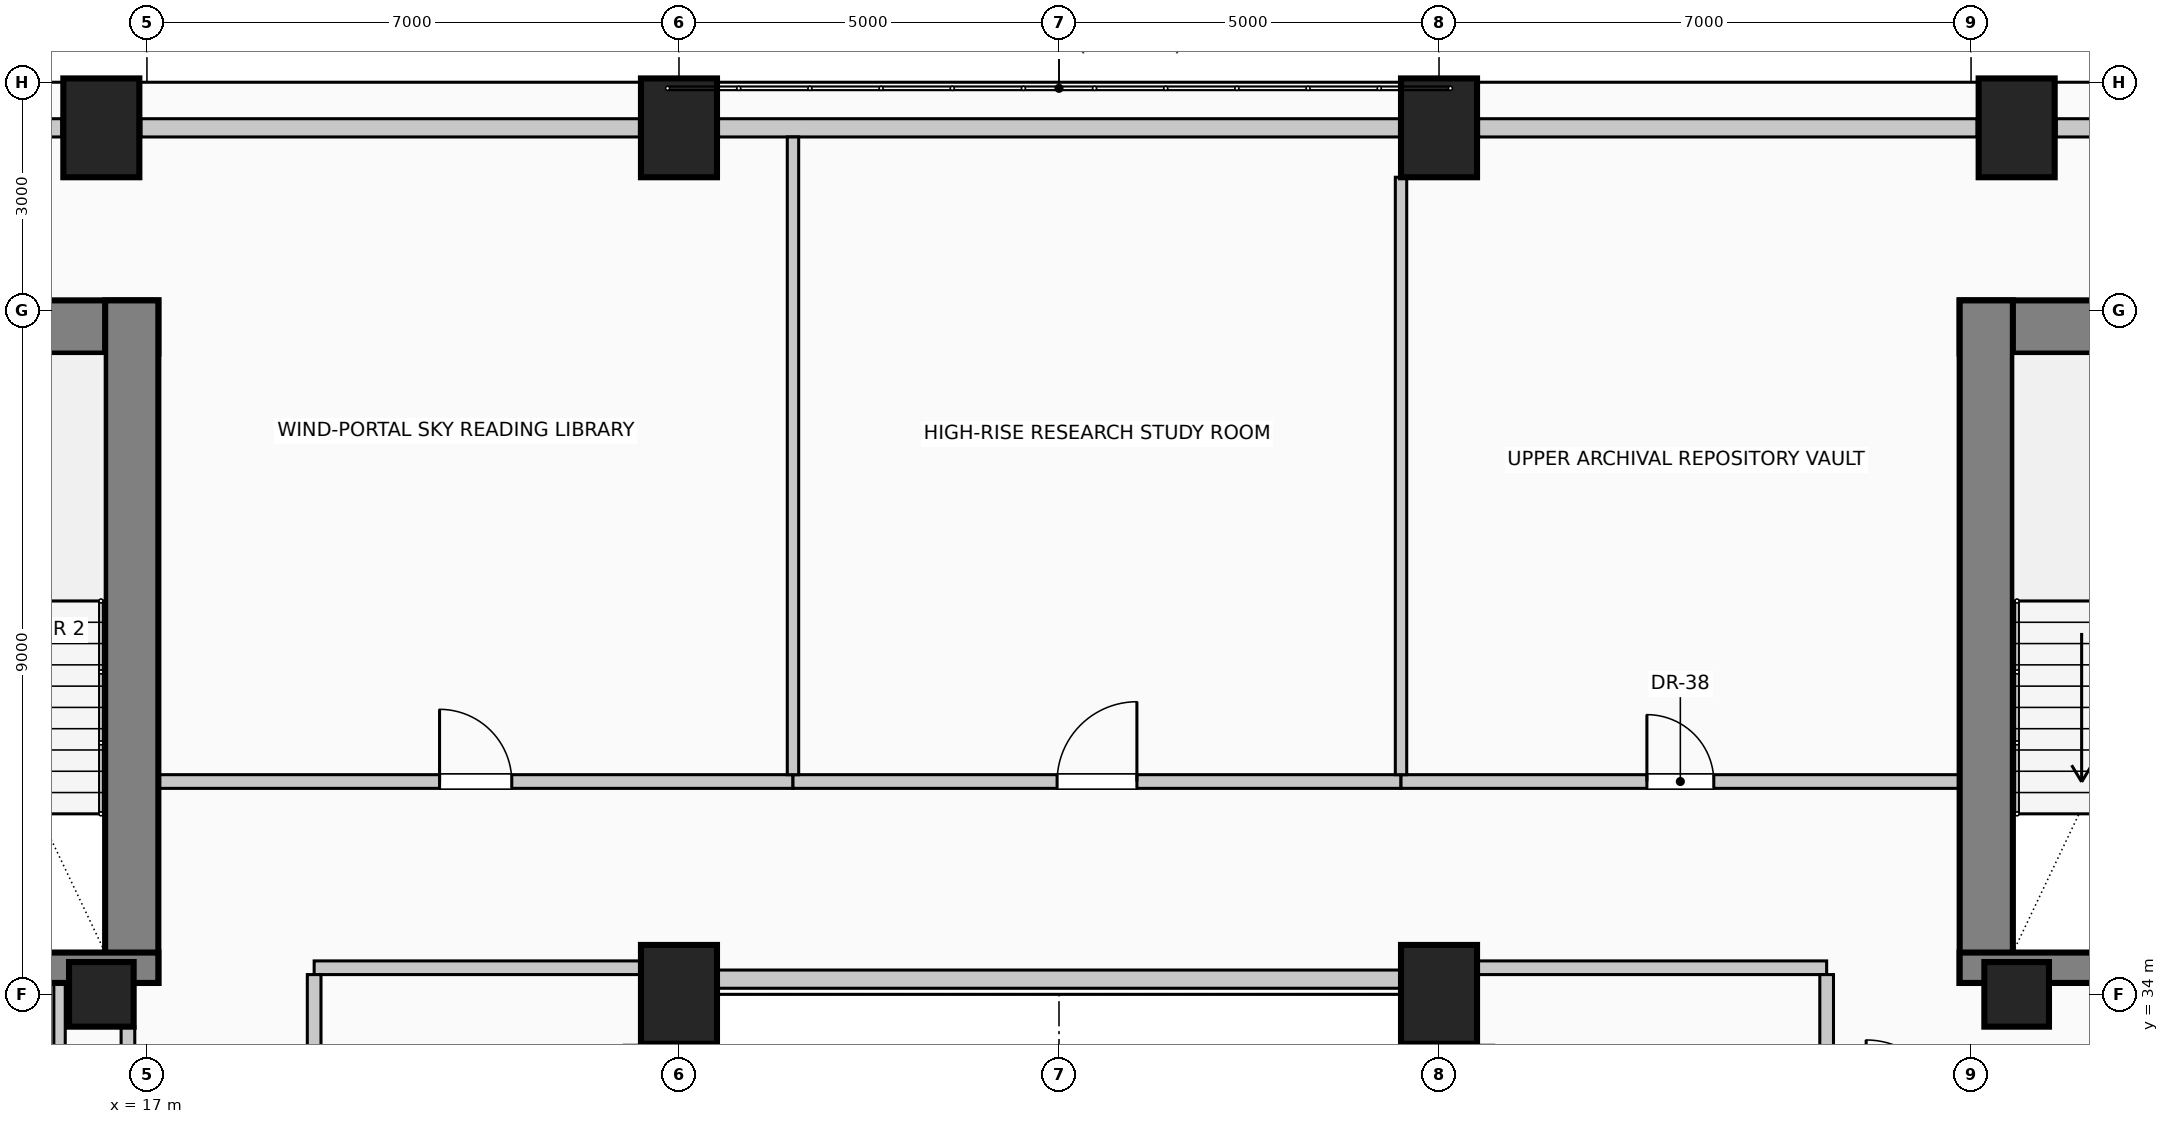
"""IFC4 building model, lengths in metres.
Left out: names, types, materials, properties, quantities, classifications, styles, units other than length and angle.
Written with IfcOpenShell. Run it as: python <this file> out.ifc"""

import sys

from ifc_helpers import new_model, si_unit, direction, frame, frame_2d, origin, origin_2d, place, context, subcontext, project, spatial, rectangle, circle, extrude, element, fill, save


model = new_model("IFC4")
c1 = context("Model", 3, precision=1e-05, world=origin(), true_north=direction((0.0, 1.0)))
c2 = subcontext(c1, "Body", "Model", "MODEL_VIEW")
j1 = project(units=[si_unit("LENGTHUNIT", "METRE"), si_unit("PLANEANGLEUNIT", "RADIAN")], contexts=[c1])
p1 = place(None, origin())
s1 = spatial("IfcSite", under=j1, at=p1, CompositionType="ELEMENT")
p2 = place(p1, origin())
s2 = spatial("IfcBuilding", under=s1, at=p2, CompositionType="ELEMENT")
p3 = place(p2, frame((0.0, 0.0, 198.6)))
s3 = spatial("IfcBuildingStorey", under=s2, at=p3, CompositionType="ELEMENT", Elevation=198.6)
p4 = place(p3, frame((2.85, 42.78, 0.0), z_axis=(0.0, 0.0, 1.0), x_axis=(1.0, 0.0, 0.0)))
e1 = element("IfcWall", 1, at=p4, inside=s3, PredefinedType="SHEAR", context=c2, shape_type="SweptSolid", body=[
    extrude(rectangle(XDim=14.3, YDim=0.7, at=frame_2d((7.15, 0.0))), origin(), (0.0, 0.0, 1.0), 4.0),
])
p5 = place(p3, frame((16.8, 34.15, 0.0), z_axis=(0.0, 0.0, 1.0), x_axis=(0.0, 1.0, 0.0)))
e2 = element("IfcWall", 2, at=p5, inside=s3, PredefinedType="SHEAR", context=c2, shape_type="SweptSolid", body=[
    extrude(rectangle(XDim=8.98, YDim=0.7, at=frame_2d((4.49, 0.0))), origin(), (0.0, 0.0, 1.0), 4.0),
])
p6 = place(p3, frame((12.29, 34.35, 0.0), z_axis=(0.0, 0.0, 1.0), x_axis=(1.0, 0.0, 0.0)))
e3 = element("IfcWall", 3, at=p6, inside=s3, PredefinedType="SHEAR", context=c2, shape_type="SweptSolid", body=[
    extrude(rectangle(XDim=4.86, YDim=0.4, at=frame_2d((2.43, 0.0))), origin(), (0.0, 0.0, 1.0), 4.0),
])
p7 = place(p6, frame((1.4, 0.0, 0.0)))
e4 = element("IfcOpeningElement", 4, at=p7, cuts=e3, PredefinedType="OPENING", context=c2, shape_type="SweptSolid", body=[
    extrude(rectangle(XDim=1.15, YDim=2.2, at=frame_2d((0.575, 1.1))), frame((0.0, 0.21, 0.0), z_axis=(0.0, -1.0, 0.0), x_axis=(1.0, 0.0, 0.0)), (0.0, 0.0, 1.0), 0.42),
])
p8 = place(p3, frame((40.85, 42.78, 0.0), z_axis=(0.0, 0.0, 1.0), x_axis=(1.0, 0.0, 0.0)))
e5 = element("IfcWall", 5, at=p8, inside=s3, PredefinedType="SHEAR", context=c2, shape_type="SweptSolid", body=[
    extrude(rectangle(XDim=14.3, YDim=0.7, at=frame_2d((7.15, 0.0))), origin(), (0.0, 0.0, 1.0), 4.0),
])
p9 = place(p3, frame((41.2, 34.15, 0.0), z_axis=(0.0, 0.0, 1.0), x_axis=(0.0, 1.0, 0.0)))
e6 = element("IfcWall", 6, at=p9, inside=s3, PredefinedType="SHEAR", context=c2, shape_type="SweptSolid", body=[
    extrude(rectangle(XDim=8.98, YDim=0.7, at=frame_2d((4.49, 0.0))), origin(), (0.0, 0.0, 1.0), 4.0),
])
p10 = place(p3, frame((40.85, 34.35, 0.0), z_axis=(0.0, 0.0, 1.0), x_axis=(1.0, 0.0, 0.0)))
e7 = element("IfcWall", 7, at=p10, inside=s3, PredefinedType="SHEAR", context=c2, shape_type="SweptSolid", body=[
    extrude(rectangle(XDim=4.86, YDim=0.4, at=frame_2d((2.43, 0.0))), origin(), (0.0, 0.0, 1.0), 4.0),
])
p11 = place(p10, frame((2.4, 0.0, 0.0)))
e8 = element("IfcOpeningElement", 8, at=p11, cuts=e7, PredefinedType="OPENING", context=c2, shape_type="SweptSolid", body=[
    extrude(rectangle(XDim=1.15, YDim=2.2, at=frame_2d((0.575, 1.1))), frame((0.0, 0.21, 0.0), z_axis=(0.0, -1.0, 0.0), x_axis=(1.0, 0.0, 0.0)), (0.0, 0.0, 1.0), 0.42),
])
for number, where, z_axis, x_axis in (
    (9, (16.4, 45.4, 0.0), (0.0, 0.0, 1.0), (1.0, 0.0, 0.0)),
    (10, (24.0, 45.4, 0.0), (0.0, 0.0, 1.0), (1.0, 0.0, 0.0)),
    (11, (34.0, 45.4, 0.0), (0.0, 0.0, 1.0), (1.0, 0.0, 0.0)),
    (12, (41.6, 45.4, 0.0), (0.0, 0.0, 1.0), (1.0, 0.0, 0.0)),
    (13, (24.0, 34.0, 0.0), (0.0, 0.0, 1.0), (1.0, 0.0, 0.0)),
    (14, (34.0, 34.0, 0.0), (0.0, 0.0, 1.0), (1.0, 0.0, 0.0)),
):
    element("IfcColumn", number, at=place(p3, frame(where, z_axis=z_axis, x_axis=x_axis)), inside=s3, PredefinedType="COLUMN", context=c2, shape_type="SweptSolid", body=[
        extrude(rectangle(XDim=1.0, YDim=1.3, at=origin_2d()), origin(), (0.0, 0.0, 1.0), 4.0),
    ])
for number, where, z_axis, x_axis in (
    (15, (16.4, 34.0, 0.0), (0.0, 0.0, 1.0), (1.0, 0.0, 0.0)),
    (16, (41.6, 34.0, 0.0), (0.0, 0.0, 1.0), (1.0, 0.0, 0.0)),
):
    element("IfcColumn", number, at=place(p3, frame(where, z_axis=z_axis, x_axis=x_axis)), inside=s3, PredefinedType="COLUMN", context=c2, shape_type="SweptSolid", body=[
        extrude(circle(Radius=0.425, at=origin_2d()), origin(), (0.0, 0.0, 1.0), 4.0),
    ])
p12 = place(p3, frame((14.42, 45.4, 0.0), z_axis=(0.0, 0.0, 1.0), x_axis=(1.0, 0.0, 0.0)))
e17 = element("IfcWall", 17, at=p12, inside=s3, PredefinedType="SOLIDWALL", context=c2, shape_type="SweptSolid", body=[
    extrude(rectangle(XDim=1.46, YDim=0.24, at=frame_2d((0.73, 0.0))), origin(), (0.0, 0.0, 1.0), 3.0),
])
p13 = place(p3, frame((16.92, 45.4, 0.0), z_axis=(0.0, 0.0, 1.0), x_axis=(1.0, 0.0, 0.0)))
e18 = element("IfcWall", 18, at=p13, inside=s3, PredefinedType="SOLIDWALL", context=c2, shape_type="SweptSolid", body=[
    extrude(rectangle(XDim=6.56, YDim=0.24, at=frame_2d((3.28, 0.0))), origin(), (0.0, 0.0, 1.0), 3.0),
])
p14 = place(p3, frame((24.52, 45.4, 0.0), z_axis=(0.0, 0.0, 1.0), x_axis=(1.0, 0.0, 0.0)))
e19 = element("IfcWall", 19, at=p14, inside=s3, PredefinedType="SOLIDWALL", context=c2, shape_type="SweptSolid", body=[
    extrude(rectangle(XDim=8.96, YDim=0.24, at=frame_2d((4.48, 0.0))), origin(), (0.0, 0.0, 1.0), 0.75),
])
p15 = place(p3, frame((34.52, 45.4, 0.0), z_axis=(0.0, 0.0, 1.0), x_axis=(1.0, 0.0, 0.0)))
e20 = element("IfcWall", 20, at=p15, inside=s3, PredefinedType="SOLIDWALL", context=c2, shape_type="SweptSolid", body=[
    extrude(rectangle(XDim=6.56, YDim=0.24, at=frame_2d((3.28, 0.0))), origin(), (0.0, 0.0, 1.0), 3.0),
])
p16 = place(p3, frame((42.12, 45.4, 0.0), z_axis=(0.0, 0.0, 1.0), x_axis=(1.0, 0.0, 0.0)))
e21 = element("IfcWall", 21, at=p16, inside=s3, PredefinedType="SOLIDWALL", context=c2, shape_type="SweptSolid", body=[
    extrude(rectangle(XDim=1.46, YDim=0.24, at=frame_2d((0.73, 0.0))), origin(), (0.0, 0.0, 1.0), 3.0),
])
p17 = place(p3, frame((33.95, 34.2, 0.0), z_axis=(0.0, 0.0, 1.0), x_axis=(-1.0, 0.0, 0.0)))
e22 = element("IfcWall", 22, at=p17, inside=s3, PredefinedType="SOLIDWALL", context=c2, shape_type="SweptSolid", body=[
    extrude(rectangle(XDim=9.9, YDim=0.24, at=frame_2d((4.95, 0.0))), origin(), (0.0, 0.0, 1.0), 0.75),
])
p18 = place(p3, frame((19.2, 34.35, 0.0), z_axis=(0.0, 0.0, 1.0), x_axis=(1.0, 0.0, 0.0)))
e23 = element("IfcWall", 23, at=p18, inside=s3, PredefinedType="PARTITIONING", context=c2, shape_type="SweptSolid", body=[
    extrude(rectangle(XDim=4.3, YDim=0.18, at=frame_2d((2.15, 0.0))), origin(), (0.0, 0.0, 1.0), 3.75),
])
p19 = place(p3, frame((34.5, 34.35, 0.0), z_axis=(0.0, 0.0, 1.0), x_axis=(1.0, 0.0, 0.0)))
e24 = element("IfcWall", 24, at=p19, inside=s3, PredefinedType="PARTITIONING", context=c2, shape_type="SweptSolid", body=[
    extrude(rectangle(XDim=4.6, YDim=0.18, at=frame_2d((2.3, 0.0))), origin(), (0.0, 0.0, 1.0), 3.75),
])
p20 = place(p3, frame((17.15, 36.8, 0.0), z_axis=(0.0, 0.0, 1.0), x_axis=(1.0, 0.0, 0.0)))
e25 = element("IfcWall", 25, at=p20, inside=s3, PredefinedType="PARTITIONING", context=c2, shape_type="SweptSolid", body=[
    extrude(rectangle(XDim=8.35, YDim=0.18, at=frame_2d((4.175, 0.0))), origin(), (0.0, 0.0, 1.0), 3.75),
])
p21 = place(p20, frame((3.7, 0.0, 0.0)))
e26 = element("IfcOpeningElement", 26, at=p21, cuts=e25, PredefinedType="OPENING", context=c2, shape_type="SweptSolid", body=[
    extrude(rectangle(XDim=0.95, YDim=2.15, at=frame_2d((0.475, 1.075))), frame((0.0, 0.1, 0.0), z_axis=(0.0, -1.0, 0.0), x_axis=(1.0, 0.0, 0.0)), (0.0, 0.0, 1.0), 0.2),
])
p22 = place(p3, frame((25.5, 36.8, 0.0), z_axis=(0.0, 0.0, 1.0), x_axis=(1.0, 0.0, 0.0)))
e27 = element("IfcWall", 27, at=p22, inside=s3, PredefinedType="PARTITIONING", context=c2, shape_type="SweptSolid", body=[
    extrude(rectangle(XDim=8.0, YDim=0.18, at=frame_2d((4.0, 0.0))), origin(), (0.0, 0.0, 1.0), 3.75),
])
p23 = place(p22, frame((3.475, 0.0, 0.0)))
e28 = element("IfcOpeningElement", 28, at=p23, cuts=e27, PredefinedType="OPENING", context=c2, shape_type="SweptSolid", body=[
    extrude(rectangle(XDim=1.05, YDim=2.15, at=frame_2d((0.525, 1.075))), frame((0.0, 0.1, 0.0), z_axis=(0.0, -1.0, 0.0), x_axis=(1.0, 0.0, 0.0)), (0.0, 0.0, 1.0), 0.2),
])
p24 = place(p3, frame((33.5, 36.8, 0.0), z_axis=(0.0, 0.0, 1.0), x_axis=(1.0, 0.0, 0.0)))
e29 = element("IfcWall", 29, at=p24, inside=s3, PredefinedType="PARTITIONING", context=c2, shape_type="SweptSolid", body=[
    extrude(rectangle(XDim=7.35, YDim=0.18, at=frame_2d((3.675, 0.0))), origin(), (0.0, 0.0, 1.0), 3.75),
])
p25 = place(p24, frame((3.235, 0.0, 0.0)))
e30 = element("IfcOpeningElement", 30, at=p25, cuts=e29, PredefinedType="OPENING", context=c2, shape_type="SweptSolid", body=[
    extrude(rectangle(XDim=0.88, YDim=2.1, at=frame_2d((0.44, 1.05))), frame((0.0, 0.1, 0.0), z_axis=(0.0, -1.0, 0.0), x_axis=(1.0, 0.0, 0.0)), (0.0, 0.0, 1.0), 0.2),
])
p26 = place(p3, frame((15.85, 32.425, 0.0), z_axis=(0.0, 0.0, 1.0), x_axis=(0.0, 1.0, 0.0)))
e31 = element("IfcWall", 31, at=p26, inside=s3, PredefinedType="PARTITIONING", context=c2, shape_type="SweptSolid", body=[
    extrude(rectangle(XDim=1.725, YDim=0.15, at=frame_2d((0.862, 0.0))), origin(), (0.0, 0.0, 1.0), 3.75),
])
p27 = place(p3, frame((16.75, 32.44, 0.0), z_axis=(0.0, 0.0, 1.0), x_axis=(0.0, 1.0, 0.0)))
e32 = element("IfcWall", 32, at=p27, inside=s3, PredefinedType="PARTITIONING", context=c2, shape_type="SweptSolid", body=[
    extrude(rectangle(XDim=1.135, YDim=0.18, at=frame_2d((0.567, 0.0))), origin(), (0.0, 0.0, 1.0), 3.75),
])
p28 = place(p3, frame((19.2, 32.44, 0.0), z_axis=(0.0, 0.0, 1.0), x_axis=(0.0, 1.0, 0.0)))
e33 = element("IfcWall", 33, at=p28, inside=s3, PredefinedType="PARTITIONING", context=c2, shape_type="SweptSolid", body=[
    extrude(rectangle(XDim=1.82, YDim=0.18, at=frame_2d((0.91, 0.0))), origin(), (0.0, 0.0, 1.0), 3.75),
])
p29 = place(p3, frame((25.5, 36.89, 0.0), z_axis=(0.0, 0.0, 1.0), x_axis=(0.0, 1.0, 0.0)))
e34 = element("IfcWall", 34, at=p29, inside=s3, PredefinedType="PARTITIONING", context=c2, shape_type="SweptSolid", body=[
    extrude(rectangle(XDim=8.39, YDim=0.15, at=frame_2d((4.195, 0.0))), origin(), (0.0, 0.0, 1.0), 3.75),
])
p30 = place(p3, frame((33.5, 36.89, 0.0), z_axis=(0.0, 0.0, 1.0), x_axis=(0.0, 1.0, 0.0)))
e35 = element("IfcWall", 35, at=p30, inside=s3, PredefinedType="PARTITIONING", context=c2, shape_type="SweptSolid", body=[
    extrude(rectangle(XDim=7.86, YDim=0.15, at=frame_2d((3.93, 0.0))), origin(), (0.0, 0.0, 1.0), 3.75),
])
p31 = place(p3, frame((39.1, 32.44, 0.0), z_axis=(0.0, 0.0, 1.0), x_axis=(0.0, 1.0, 0.0)))
e36 = element("IfcWall", 36, at=p31, inside=s3, PredefinedType="PARTITIONING", context=c2, shape_type="SweptSolid", body=[
    extrude(rectangle(XDim=1.82, YDim=0.18, at=frame_2d((0.91, 0.0))), origin(), (0.0, 0.0, 1.0), 3.75),
])
p32 = place(p21, origin())
e37 = element("IfcDoor", 37, at=p32, inside=s3, OperationType="SINGLE_SWING_LEFT", PredefinedType="DOOR", context=c2, shape_type="SweptSolid", body=[
    extrude(rectangle(XDim=0.95, YDim=2.15, at=frame_2d((0.475, 1.075))), frame((0.0, 0.025, 0.0), z_axis=(0.0, -1.0, 0.0), x_axis=(1.0, 0.0, 0.0)), (0.0, 0.0, 1.0), 0.05),
])
fill(e26, e37)
p33 = place(p23, origin())
e38 = element("IfcDoor", 38, at=p33, inside=s3, OperationType="SINGLE_SWING_RIGHT", PredefinedType="DOOR", context=c2, shape_type="SweptSolid", body=[
    extrude(rectangle(XDim=1.05, YDim=2.15, at=frame_2d((0.525, 1.075))), frame((0.0, 0.025, 0.0), z_axis=(0.0, -1.0, 0.0), x_axis=(1.0, 0.0, 0.0)), (0.0, 0.0, 1.0), 0.05),
])
fill(e28, e38)
p34 = place(p25, origin())
e39 = element("IfcDoor", 39, at=p34, inside=s3, OperationType="SINGLE_SWING_LEFT", PredefinedType="DOOR", context=c2, shape_type="SweptSolid", body=[
    extrude(rectangle(XDim=0.88, YDim=2.1, at=frame_2d((0.44, 1.05))), frame((0.0, 0.025, 0.0), z_axis=(0.0, -1.0, 0.0), x_axis=(1.0, 0.0, 0.0)), (0.0, 0.0, 1.0), 0.05),
])
fill(e30, e39)
save(model, sys.argv[1])
